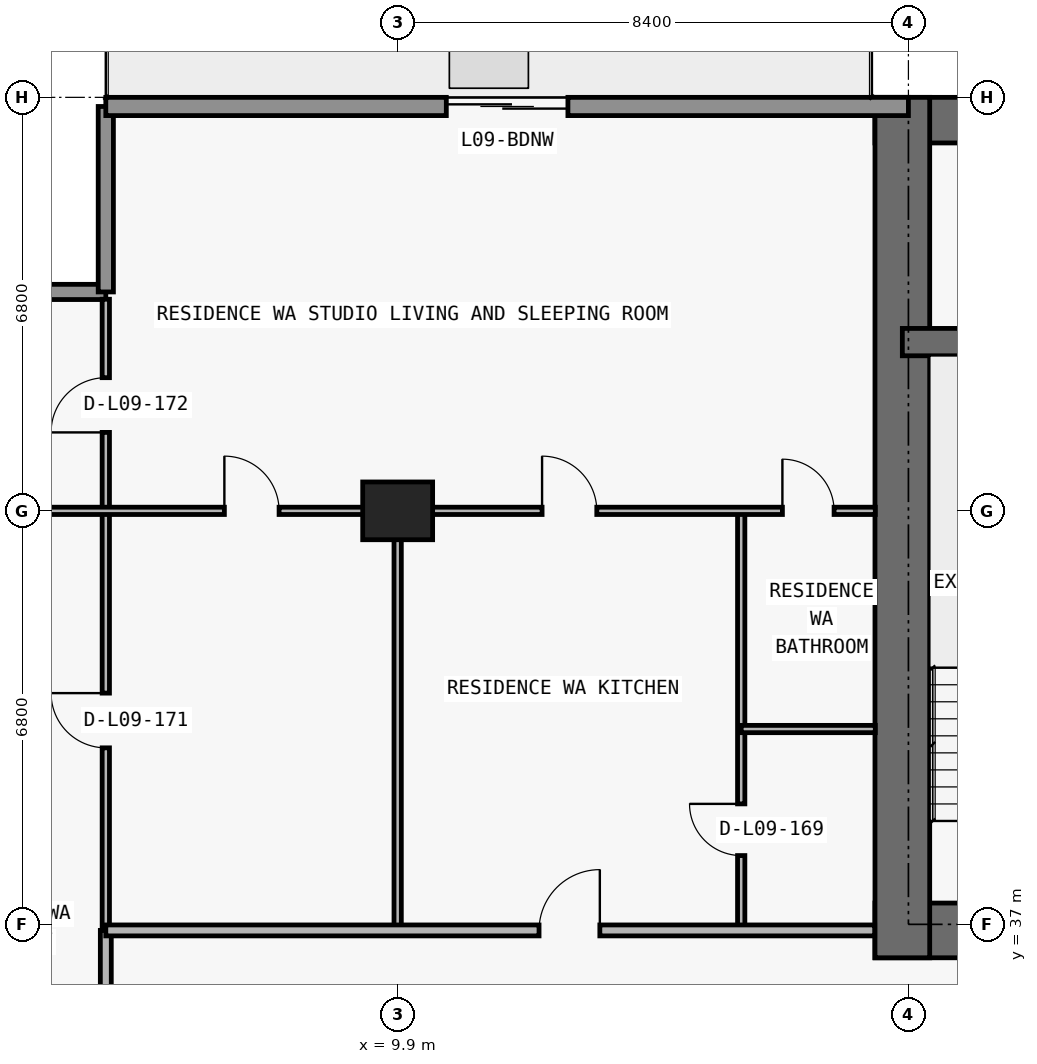
"""IFC4 building model, lengths in metres.
Left out: names, types, materials, properties, quantities, classifications, styles, units other than length and angle.
Written with IfcOpenShell. Run it as: python <this file> out.ifc"""

import sys

from ifc_helpers import new_model, si_unit, direction, frame, frame_2d, origin, origin_2d, place, context, subcontext, project, spatial, rectangle, extrude, element, fill, save


model = new_model("IFC4")
c1 = context("Model", 3, precision=1e-05, world=origin(), true_north=direction((0.0, 1.0)))
c2 = subcontext(c1, "Body", "Model", "MODEL_VIEW")
j1 = project(units=[si_unit("LENGTHUNIT", "METRE"), si_unit("PLANEANGLEUNIT", "RADIAN")], contexts=[c1])
p1 = place(None, origin())
s1 = spatial("IfcSite", under=j1, at=p1, CompositionType="ELEMENT")
p2 = place(p1, origin())
s2 = spatial("IfcBuilding", under=s1, at=p2, CompositionType="ELEMENT")
p3 = place(p2, frame((0.0, 0.0, 39.9)))
s3 = spatial("IfcBuildingStorey", under=s2, at=p3, CompositionType="ELEMENT", Elevation=39.9)
p4 = place(p3, frame((9.9, 43.8, 0.0), z_axis=(0.0, 0.0, 1.0), x_axis=(1.0, 0.0, 0.0)))
e1 = element("IfcColumn", 1, at=p4, inside=s3, PredefinedType="COLUMN", context=c2, shape_type="SweptSolid", body=[
    extrude(rectangle(XDim=1.15, YDim=0.95, at=origin_2d()), origin(), (0.0, 0.0, 1.0), 3.05),
])
p5 = place(p3, frame((17.75, 36.9, 0.0), z_axis=(0.0, 0.0, 1.0), x_axis=(1.0, 0.0, 0.0)))
e2 = element("IfcWall", 2, at=p5, inside=s3, PredefinedType="SHEAR", context=c2, shape_type="SweptSolid", body=[
    extrude(rectangle(XDim=42.3, YDim=0.9, at=frame_2d((21.15, 0.0))), origin(), (0.0, 0.0, 1.0), 3.05),
])
p6 = place(p5, frame((14.55, 0.0, 0.0)))
e3 = element("IfcOpeningElement", 3, at=p6, cuts=e2, PredefinedType="OPENING", context=c2, shape_type="SweptSolid", body=[
    extrude(rectangle(XDim=1.1, YDim=2.15, at=frame_2d((0.55, 1.075))), frame((0.0, 0.46, 0.0), z_axis=(0.0, -1.0, 0.0), x_axis=(1.0, 0.0, 0.0)), (0.0, 0.0, 1.0), 0.92),
])
p7 = place(p5, frame((6.4, 0.0, 0.0)))
e4 = element("IfcOpeningElement", 4, at=p7, cuts=e2, PredefinedType="OPENING", context=c2, shape_type="SweptSolid", body=[
    extrude(rectangle(XDim=1.05, YDim=2.15, at=frame_2d((0.525, 1.075))), frame((0.0, 0.46, 0.0), z_axis=(0.0, -1.0, 0.0), x_axis=(1.0, 0.0, 0.0)), (0.0, 0.0, 1.0), 0.92),
])
p8 = place(p5, frame((34.9, 0.0, 0.0)))
e5 = element("IfcOpeningElement", 5, at=p8, cuts=e2, PredefinedType="OPENING", context=c2, shape_type="SweptSolid", body=[
    extrude(rectangle(XDim=1.05, YDim=2.15, at=frame_2d((0.525, 1.075))), frame((0.0, 0.46, 0.0), z_axis=(0.0, -1.0, 0.0), x_axis=(1.0, 0.0, 0.0)), (0.0, 0.0, 1.0), 0.92),
])
p9 = place(p5, frame((11.012, 0.0, 0.0)))
e6 = element("IfcOpeningElement", 6, at=p9, cuts=e2, PredefinedType="OPENING", context=c2, shape_type="SweptSolid", body=[
    extrude(rectangle(XDim=1.05, YDim=2.15, at=frame_2d((0.525, 1.075))), frame((0.0, 0.46, 0.0), z_axis=(0.0, -1.0, 0.0), x_axis=(1.0, 0.0, 0.0)), (0.0, 0.0, 1.0), 0.92),
])
p10 = place(p5, frame((24.25, 0.0, 0.0)))
e7 = element("IfcOpeningElement", 7, at=p10, cuts=e2, PredefinedType="OPENING", context=c2, shape_type="SweptSolid", body=[
    extrude(rectangle(XDim=1.05, YDim=2.15, at=frame_2d((0.525, 1.075))), frame((0.0, 0.46, 0.0), z_axis=(0.0, -1.0, 0.0), x_axis=(1.0, 0.0, 0.0)), (0.0, 0.0, 1.0), 0.92),
])
p11 = place(p3, frame((17.75, 50.225, 0.0), z_axis=(0.0, 0.0, 1.0), x_axis=(1.0, 0.0, 0.0)))
e8 = element("IfcWall", 8, at=p11, inside=s3, PredefinedType="SHEAR", context=c2, shape_type="SweptSolid", body=[
    extrude(rectangle(XDim=42.3, YDim=0.75, at=frame_2d((21.15, 0.0))), origin(), (0.0, 0.0, 1.0), 3.05),
])
p12 = place(p3, frame((18.2, 36.45, 0.0), z_axis=(0.0, 0.0, 1.0), x_axis=(0.0, 1.0, 0.0)))
e9 = element("IfcWall", 9, at=p12, inside=s3, PredefinedType="SHEAR", context=c2, shape_type="SweptSolid", body=[
    extrude(rectangle(XDim=14.15, YDim=0.9, at=frame_2d((7.075, 0.0))), origin(), (0.0, 0.0, 1.0), 3.05),
])
p13 = place(p3, frame((18.2, 46.575, 0.0), z_axis=(0.0, 0.0, 1.0), x_axis=(1.0, 0.0, 0.0)))
e10 = element("IfcWall", 10, at=p13, inside=s3, PredefinedType="SHEAR", context=c2, shape_type="SweptSolid", body=[
    extrude(rectangle(XDim=41.4, YDim=0.45, at=frame_2d((20.7, 0.0))), origin(), (0.0, 0.0, 1.0), 3.05),
])
p14 = place(p13, frame((7.7, 0.0, 0.0)))
e11 = element("IfcOpeningElement", 11, at=p14, cuts=e10, PredefinedType="OPENING", context=c2, shape_type="SweptSolid", body=[
    extrude(rectangle(XDim=1.0, YDim=2.2, at=frame_2d((0.5, 1.1))), frame((0.0, 0.235, 0.0), z_axis=(0.0, -1.0, 0.0), x_axis=(1.0, 0.0, 0.0)), (0.0, 0.0, 1.0), 0.47),
])
p15 = place(p13, frame((32.725, 0.0, 0.0)))
e12 = element("IfcOpeningElement", 12, at=p15, cuts=e10, PredefinedType="OPENING", context=c2, shape_type="SweptSolid", body=[
    extrude(rectangle(XDim=1.05, YDim=2.15, at=frame_2d((0.525, 1.075))), frame((0.0, 0.235, 0.0), z_axis=(0.0, -1.0, 0.0), x_axis=(1.0, 0.0, 0.0)), (0.0, 0.0, 1.0), 0.47),
])
p16 = place(p3, frame((1.65, 47.4, 0.0), z_axis=(0.0, 0.0, 1.0), x_axis=(1.0, 0.0, 0.0)))
e13 = element("IfcWall", 13, at=p16, inside=s3, PredefinedType="ELEMENTEDWALL", context=c2, shape_type="SweptSolid", body=[
    extrude(rectangle(XDim=3.45, YDim=0.25, at=frame_2d((1.725, 0.0))), origin(), (0.0, 0.0, 1.0), 3.05),
])
p17 = place(p3, frame((5.1, 47.4, 0.0), z_axis=(0.0, 0.0, 1.0), x_axis=(0.0, 1.0, 0.0)))
e14 = element("IfcWall", 14, at=p17, inside=s3, PredefinedType="ELEMENTEDWALL", context=c2, shape_type="SweptSolid", body=[
    extrude(rectangle(XDim=3.05, YDim=0.25, at=frame_2d((1.525, 0.0))), origin(), (0.0, 0.0, 1.0), 3.05),
])
p18 = place(p3, frame((5.1, 50.45, 0.0), z_axis=(0.0, 0.0, 1.0), x_axis=(1.0, 0.0, 0.0)))
e15 = element("IfcWall", 15, at=p18, inside=s3, PredefinedType="STANDARD", context=c2, shape_type="SweptSolid", body=[
    extrude(rectangle(XDim=13.2, YDim=0.3, at=frame_2d((6.6, 0.0))), origin(), (0.0, 0.0, 1.0), 3.05),
])
p19 = place(p18, frame((5.6, 0.0, 0.0)))
e16 = element("IfcOpeningElement", 16, at=p19, cuts=e15, PredefinedType="OPENING", context=c2, shape_type="SweptSolid", body=[
    extrude(rectangle(XDim=2.0, YDim=2.3, at=frame_2d((1.0, 1.15))), frame((0.0, 0.16, 0.0), z_axis=(0.0, -1.0, 0.0), x_axis=(1.0, 0.0, 0.0)), (0.0, 0.0, 1.0), 0.32),
])
p20 = place(p3, frame((5.1, 34.005, 0.0), z_axis=(0.0, 0.0, 1.0), x_axis=(0.0, 1.0, 0.0)))
e17 = element("IfcWall", 17, at=p20, inside=s3, PredefinedType="PARTITIONING", context=c2, shape_type="SweptSolid", body=[
    extrude(rectangle(XDim=2.895, YDim=0.18, at=frame_2d((1.448, 0.0))), origin(), (0.0, 0.0, 1.0), 3.05),
])
p21 = place(p3, frame((5.1, 36.905, 0.0), z_axis=(0.0, 0.0, 1.0), x_axis=(0.0, 1.0, 0.0)))
e18 = element("IfcWall", 18, at=p21, inside=s3, PredefinedType="PARTITIONING", context=c2, shape_type="SweptSolid", body=[
    extrude(rectangle(XDim=10.375, YDim=0.12, at=frame_2d((5.188, 0.0))), origin(), (0.0, 0.0, 1.0), 3.05),
])
p22 = place(p21, frame((2.998, 0.0, 0.0)))
e19 = element("IfcOpeningElement", 19, at=p22, cuts=e18, PredefinedType="OPENING", context=c2, shape_type="SweptSolid", body=[
    extrude(rectangle(XDim=0.9, YDim=2.15, at=frame_2d((0.45, 1.075))), frame((0.0, 0.07, 0.0), z_axis=(0.0, -1.0, 0.0), x_axis=(1.0, 0.0, 0.0)), (0.0, 0.0, 1.0), 0.14),
])
p23 = place(p21, frame((8.185, 0.0, 0.0)))
e20 = element("IfcOpeningElement", 20, at=p23, cuts=e18, PredefinedType="OPENING", context=c2, shape_type="SweptSolid", body=[
    extrude(rectangle(XDim=0.9, YDim=2.15, at=frame_2d((0.45, 1.075))), frame((0.0, 0.07, 0.0), z_axis=(0.0, -1.0, 0.0), x_axis=(1.0, 0.0, 0.0)), (0.0, 0.0, 1.0), 0.14),
])
p24 = place(p3, frame((9.9, 36.9, 0.0), z_axis=(0.0, 0.0, 1.0), x_axis=(0.0, 1.0, 0.0)))
e21 = element("IfcWall", 21, at=p24, inside=s3, PredefinedType="PARTITIONING", context=c2, shape_type="SweptSolid", body=[
    extrude(rectangle(XDim=6.9, YDim=0.12, at=frame_2d((3.45, 0.0))), origin(), (0.0, 0.0, 1.0), 2.11),
])
p25 = place(p3, frame((15.55, 36.9, 0.0), z_axis=(0.0, 0.0, 1.0), x_axis=(0.0, 1.0, 0.0)))
e22 = element("IfcWall", 22, at=p25, inside=s3, PredefinedType="PARTITIONING", context=c2, shape_type="SweptSolid", body=[
    extrude(rectangle(XDim=6.9, YDim=0.12, at=frame_2d((3.45, 0.0))), origin(), (0.0, 0.0, 1.0), 3.05),
])
p26 = place(p25, frame((1.231, 0.0, 0.0)))
e23 = element("IfcOpeningElement", 23, at=p26, cuts=e22, PredefinedType="OPENING", context=c2, shape_type="SweptSolid", body=[
    extrude(rectangle(XDim=0.85, YDim=2.1, at=frame_2d((0.425, 1.05))), frame((0.0, 0.07, 0.0), z_axis=(0.0, -1.0, 0.0), x_axis=(1.0, 0.0, 0.0)), (0.0, 0.0, 1.0), 0.14),
])
p27 = place(p3, frame((5.1, 36.9, 0.0), z_axis=(0.0, 0.0, 1.0), x_axis=(1.0, 0.0, 0.0)))
e24 = element("IfcWall", 24, at=p27, inside=s3, PredefinedType="PARTITIONING", context=c2, shape_type="SweptSolid", body=[
    extrude(rectangle(XDim=12.645, YDim=0.18, at=frame_2d((6.323, 0.0))), origin(), (0.0, 0.0, 1.0), 3.05),
])
p28 = place(p27, frame((7.125, 0.0, 0.0)))
e25 = element("IfcOpeningElement", 25, at=p28, cuts=e24, PredefinedType="OPENING", context=c2, shape_type="SweptSolid", body=[
    extrude(rectangle(XDim=1.0, YDim=2.2, at=frame_2d((0.5, 1.1))), frame((0.0, 0.1, 0.0), z_axis=(0.0, -1.0, 0.0), x_axis=(1.0, 0.0, 0.0)), (0.0, 0.0, 1.0), 0.2),
])
p29 = place(p3, frame((15.55, 40.212, 0.0), z_axis=(0.0, 0.0, 1.0), x_axis=(1.0, 0.0, 0.0)))
e26 = element("IfcWall", 26, at=p29, inside=s3, PredefinedType="PARTITIONING", context=c2, shape_type="SweptSolid", body=[
    extrude(rectangle(XDim=2.205, YDim=0.12, at=frame_2d((1.103, 0.0))), origin(), (0.0, 0.0, 1.0), 3.05),
])
p30 = place(p3, frame((1.795, 43.8, 0.0), z_axis=(0.0, 0.0, 1.0), x_axis=(1.0, 0.0, 0.0)))
e27 = element("IfcWall", 27, at=p30, inside=s3, PredefinedType="PARTITIONING", context=c2, shape_type="SweptSolid", body=[
    extrude(rectangle(XDim=15.96, YDim=0.12, at=frame_2d((7.98, 0.0))), origin(), (0.0, 0.0, 1.0), 2.339),
])
p31 = place(p30, frame((5.255, 0.0, 0.0)))
e28 = element("IfcOpeningElement", 28, at=p31, cuts=e27, PredefinedType="OPENING", context=c2, shape_type="SweptSolid", body=[
    extrude(rectangle(XDim=0.9, YDim=2.15, at=frame_2d((0.45, 1.075))), frame((0.0, 0.07, 0.0), z_axis=(0.0, -1.0, 0.0), x_axis=(1.0, 0.0, 0.0)), (0.0, 0.0, 1.0), 0.14),
])
p32 = place(p30, frame((10.48, 0.0, 0.0)))
e29 = element("IfcOpeningElement", 29, at=p32, cuts=e27, PredefinedType="OPENING", context=c2, shape_type="SweptSolid", body=[
    extrude(rectangle(XDim=0.9, YDim=2.15, at=frame_2d((0.45, 1.075))), frame((0.0, 0.07, 0.0), z_axis=(0.0, -1.0, 0.0), x_axis=(1.0, 0.0, 0.0)), (0.0, 0.0, 1.0), 0.14),
])
p33 = place(p30, frame((14.433, 0.0, 0.0)))
e30 = element("IfcOpeningElement", 30, at=p33, cuts=e27, PredefinedType="OPENING", context=c2, shape_type="SweptSolid", body=[
    extrude(rectangle(XDim=0.85, YDim=2.1, at=frame_2d((0.425, 1.05))), frame((0.0, 0.07, 0.0), z_axis=(0.0, -1.0, 0.0), x_axis=(1.0, 0.0, 0.0)), (0.0, 0.0, 1.0), 0.14),
])
p34 = place(p19, origin())
e31 = element("IfcDoor", 31, at=p34, inside=s3, OperationType="DOUBLE_DOOR_SLIDING", PredefinedType="DOOR", context=c2, shape_type="SweptSolid", body=[
    extrude(rectangle(XDim=2.0, YDim=2.3, at=frame_2d((1.0, 1.15))), frame((0.0, 0.025, 0.0), z_axis=(0.0, -1.0, 0.0), x_axis=(1.0, 0.0, 0.0)), (0.0, 0.0, 1.0), 0.05),
])
fill(e16, e31)
p35 = place(p31, origin())
e32 = element("IfcDoor", 32, at=p35, inside=s3, OperationType="SINGLE_SWING_LEFT", PredefinedType="DOOR", context=c2, shape_type="SweptSolid", body=[
    extrude(rectangle(XDim=0.9, YDim=2.15, at=frame_2d((0.45, 1.075))), frame((0.0, 0.025, 0.0), z_axis=(0.0, -1.0, 0.0), x_axis=(1.0, 0.0, 0.0)), (0.0, 0.0, 1.0), 0.05),
])
fill(e28, e32)
p36 = place(p28, origin())
e33 = element("IfcDoor", 33, at=p36, inside=s3, OperationType="SINGLE_SWING_RIGHT", PredefinedType="DOOR", context=c2, shape_type="SweptSolid", body=[
    extrude(rectangle(XDim=1.0, YDim=2.2, at=frame_2d((0.5, 1.1))), frame((0.0, 0.025, 0.0), z_axis=(0.0, -1.0, 0.0), x_axis=(1.0, 0.0, 0.0)), (0.0, 0.0, 1.0), 0.05),
])
fill(e25, e33)
p37 = place(p32, origin())
e34 = element("IfcDoor", 34, at=p37, inside=s3, OperationType="SINGLE_SWING_LEFT", PredefinedType="DOOR", context=c2, shape_type="SweptSolid", body=[
    extrude(rectangle(XDim=0.9, YDim=2.15, at=frame_2d((0.45, 1.075))), frame((0.0, 0.025, 0.0), z_axis=(0.0, -1.0, 0.0), x_axis=(1.0, 0.0, 0.0)), (0.0, 0.0, 1.0), 0.05),
])
fill(e29, e34)
p38 = place(p26, origin())
e35 = element("IfcDoor", 35, at=p38, inside=s3, OperationType="SINGLE_SWING_RIGHT", PredefinedType="DOOR", context=c2, shape_type="SweptSolid", body=[
    extrude(rectangle(XDim=0.85, YDim=2.1, at=frame_2d((0.425, 1.05))), frame((0.0, 0.025, 0.0), z_axis=(0.0, -1.0, 0.0), x_axis=(1.0, 0.0, 0.0)), (0.0, 0.0, 1.0), 0.05),
])
fill(e23, e35)
p39 = place(p33, origin())
e36 = element("IfcDoor", 36, at=p39, inside=s3, OperationType="SINGLE_SWING_LEFT", PredefinedType="DOOR", context=c2, shape_type="SweptSolid", body=[
    extrude(rectangle(XDim=0.85, YDim=2.1, at=frame_2d((0.425, 1.05))), frame((0.0, 0.025, 0.0), z_axis=(0.0, -1.0, 0.0), x_axis=(1.0, 0.0, 0.0)), (0.0, 0.0, 1.0), 0.05),
])
fill(e30, e36)
p40 = place(p22, origin())
e37 = element("IfcDoor", 37, at=p40, inside=s3, OperationType="SINGLE_SWING_RIGHT", PredefinedType="DOOR", context=c2, shape_type="SweptSolid", body=[
    extrude(rectangle(XDim=0.9, YDim=2.15, at=frame_2d((0.45, 1.075))), frame((0.0, 0.025, 0.0), z_axis=(0.0, -1.0, 0.0), x_axis=(1.0, 0.0, 0.0)), (0.0, 0.0, 1.0), 0.05),
])
fill(e19, e37)
p41 = place(p23, origin())
e38 = element("IfcDoor", 38, at=p41, inside=s3, OperationType="SINGLE_SWING_LEFT", PredefinedType="DOOR", context=c2, shape_type="SweptSolid", body=[
    extrude(rectangle(XDim=0.9, YDim=2.15, at=frame_2d((0.45, 1.075))), frame((0.0, 0.025, 0.0), z_axis=(0.0, -1.0, 0.0), x_axis=(1.0, 0.0, 0.0)), (0.0, 0.0, 1.0), 0.05),
])
fill(e20, e38)
save(model, sys.argv[1])
